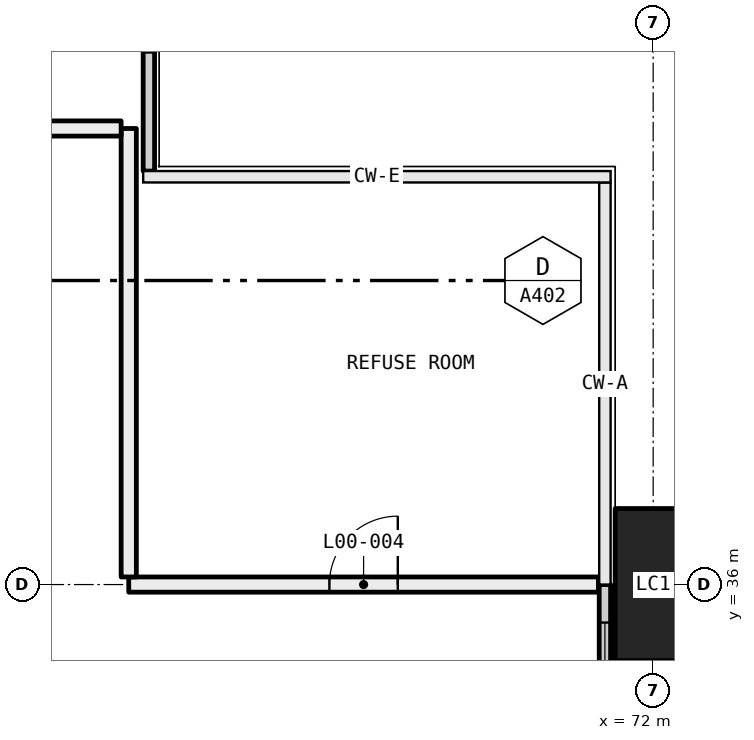
"""IFC4 building model, lengths in metres.
Left out: names, types, materials, properties, quantities, classifications, styles, units other than length and angle.
Written with IfcOpenShell. Run it as: python <this file> out.ifc"""

import sys

from ifc_helpers import new_model, si_unit, direction, frame, frame_2d, origin, origin_2d, place, context, subcontext, project, spatial, rectangle, hollow_rectangle, extrude, element, fill, save


model = new_model("IFC4")
c1 = context("Model", 3, precision=1e-05, world=origin(), true_north=direction((0.0, 1.0)))
c2 = subcontext(c1, "Body", "Model", "MODEL_VIEW")
j1 = project(units=[si_unit("LENGTHUNIT", "METRE"), si_unit("PLANEANGLEUNIT", "RADIAN")], contexts=[c1])
p1 = place(None, origin())
s1 = spatial("IfcSite", under=j1, at=p1, CompositionType="ELEMENT")
p2 = place(p1, origin())
s2 = spatial("IfcBuilding", under=s1, at=p2, CompositionType="ELEMENT")
p3 = place(p2, origin())
s3 = spatial("IfcBuildingStorey", under=s2, at=p3, CompositionType="ELEMENT", Elevation=0.0)
p4 = place(p3, frame((72.0, 36.0, -0.9), z_axis=(0.0, 0.0, 1.0), x_axis=(0.0, 1.0, 0.0)))
e1 = element("IfcColumn", 1, at=p4, inside=s3, PredefinedType="COLUMN", context=c2, shape_type="SweptSolid", body=[
    extrude(hollow_rectangle(XDim=2.0, YDim=1.0, WallThickness=0.08, at=origin_2d()), origin(), (0.0, 0.0, 1.0), 6.5),
])
p5 = place(p3, frame((71.365, 30.0, 0.0), z_axis=(0.0, 0.0, 1.0), x_axis=(0.0, 1.0, 0.0)))
e2 = element("IfcWall", 2, at=p5, inside=s3, PredefinedType="ELEMENTEDWALL", context=c2, shape_type="SweptSolid", body=[
    extrude(rectangle(XDim=6.0, YDim=0.15, at=frame_2d((3.0, 0.0))), origin(), (0.0, 0.0, 1.0), 5.6),
])
p6 = place(p5, frame((0.5, 0.0, 0.45)))
e3 = element("IfcOpeningElement", 3, at=p6, cuts=e2, PredefinedType="OPENING", context=c2, shape_type="SweptSolid", body=[
    extrude(rectangle(XDim=1.4, YDim=5.1, at=frame_2d((0.7, 2.55))), frame((0.0, 0.085, 0.0), z_axis=(0.0, -1.0, 0.0), x_axis=(1.0, 0.0, 0.0)), (0.0, 0.0, 1.0), 0.17),
])
p7 = place(p5, frame((4.1, 0.0, 0.45)))
e4 = element("IfcOpeningElement", 4, at=p7, cuts=e2, PredefinedType="OPENING", context=c2, shape_type="SweptSolid", body=[
    extrude(rectangle(XDim=1.4, YDim=5.1, at=frame_2d((0.7, 2.55))), frame((0.0, 0.085, 0.0), z_axis=(0.0, -1.0, 0.0), x_axis=(1.0, 0.0, 0.0)), (0.0, 0.0, 1.0), 0.17),
])
p8 = place(p5, frame((2.1, 0.0, 0.0)))
e5 = element("IfcOpeningElement", 5, at=p8, cuts=e2, PredefinedType="OPENING", context=c2, shape_type="SweptSolid", body=[
    extrude(rectangle(XDim=1.8, YDim=2.4, at=frame_2d((0.9, 1.2))), frame((0.0, 0.085, 0.0), z_axis=(0.0, -1.0, 0.0), x_axis=(1.0, 0.0, 0.0)), (0.0, 0.0, 1.0), 0.17),
])
p9 = place(p5, frame((2.1, 0.0, 2.6)))
e6 = element("IfcOpeningElement", 6, at=p9, cuts=e2, PredefinedType="OPENING", context=c2, shape_type="SweptSolid", body=[
    extrude(rectangle(XDim=1.8, YDim=2.95, at=frame_2d((0.9, 1.475))), frame((0.0, 0.085, 0.0), z_axis=(0.0, -1.0, 0.0), x_axis=(1.0, 0.0, 0.0)), (0.0, 0.0, 1.0), 0.17),
])
p10 = place(p3, frame((65.365, 41.44, 0.0), z_axis=(0.0, 0.0, 1.0), x_axis=(0.0, 1.0, 0.0)))
e7 = element("IfcWall", 7, at=p10, inside=s3, PredefinedType="ELEMENTEDWALL", context=c2, shape_type="SweptSolid", body=[
    extrude(rectangle(XDim=5.85, YDim=0.15, at=frame_2d((2.925, 0.0))), origin(), (0.0, 0.0, 1.0), 5.6),
])
p11 = place(p10, frame((1.56, 0.0, 0.45)))
e8 = element("IfcOpeningElement", 8, at=p11, cuts=e7, PredefinedType="OPENING", context=c2, shape_type="SweptSolid", body=[
    extrude(rectangle(XDim=4.0, YDim=5.1, at=frame_2d((2.0, 2.55))), frame((0.0, 0.085, 0.0), z_axis=(0.0, -1.0, 0.0), x_axis=(1.0, 0.0, 0.0)), (0.0, 0.0, 1.0), 0.17),
])
p12 = place(p3, frame((71.28, 36.0, 0.0), z_axis=(0.0, 0.0, 1.0), x_axis=(-1.0, 0.0, 0.0)))
e9 = element("IfcWall", 9, at=p12, inside=s3, PredefinedType="PARTITIONING", context=c2, shape_type="SweptSolid", body=[
    extrude(rectangle(XDim=6.18, YDim=0.2, at=frame_2d((3.09, 0.0))), origin(), (0.0, 0.0, 1.0), 5.0),
])
p13 = place(p12, frame((2.64, 0.0, 0.0)))
e10 = element("IfcOpeningElement", 10, at=p13, cuts=e9, PredefinedType="OPENING", context=c2, shape_type="SweptSolid", body=[
    extrude(rectangle(XDim=0.9, YDim=2.1, at=frame_2d((0.45, 1.05))), frame((0.0, 0.11, 0.0), z_axis=(0.0, -1.0, 0.0), x_axis=(1.0, 0.0, 0.0)), (0.0, 0.0, 1.0), 0.22),
])
p14 = place(p3, frame((65.1, 36.1, 0.0), z_axis=(0.0, 0.0, 1.0), x_axis=(0.0, 1.0, 0.0)))
e11 = element("IfcWall", 11, at=p14, inside=s3, PredefinedType="PARTITIONING", context=c2, shape_type="SweptSolid", body=[
    extrude(rectangle(XDim=5.9, YDim=0.2, at=frame_2d((2.95, 0.0))), origin(), (0.0, 0.0, 1.0), 5.6),
])
p15 = place(p3, frame((65.0, 42.0, 0.0), z_axis=(0.0, 0.0, 1.0), x_axis=(-1.0, 0.0, 0.0)))
e12 = element("IfcWall", 12, at=p15, inside=s3, PredefinedType="PARTITIONING", context=c2, shape_type="SweptSolid", body=[
    extrude(rectangle(XDim=5.0, YDim=0.2, at=frame_2d((2.5, 0.0))), origin(), (0.0, 0.0, 1.0), 5.6),
])
p16 = place(p15, frame((1.9, 0.0, 0.0)))
e13 = element("IfcOpeningElement", 13, at=p16, cuts=e12, PredefinedType="OPENING", context=c2, shape_type="SweptSolid", body=[
    extrude(rectangle(XDim=1.2, YDim=2.1, at=frame_2d((0.6, 1.05))), frame((0.0, 0.11, 0.0), z_axis=(0.0, -1.0, 0.0), x_axis=(1.0, 0.0, 0.0)), (0.0, 0.0, 1.0), 0.22),
])
p17 = place(p7, origin())
e14 = element("IfcWindow", 14, at=p17, inside=s3, PartitioningType="SINGLE_PANEL", PredefinedType="WINDOW", context=c2, shape_type="SweptSolid", body=[
    extrude(rectangle(XDim=1.4, YDim=5.1, at=frame_2d((0.7, 2.55))), frame((0.0, 0.03, 0.0), z_axis=(0.0, -1.0, 0.0), x_axis=(1.0, 0.0, 0.0)), (0.0, 0.0, 1.0), 0.06),
])
fill(e4, e14)
p18 = place(p13, frame((0.9, 0.0, 0.0), x_axis=(-1.0, 0.0, 0.0)))
e15 = element("IfcDoor", 15, at=p18, inside=s3, OperationType="SINGLE_SWING_LEFT", PredefinedType="DOOR", context=c2, shape_type="SweptSolid", body=[
    extrude(rectangle(XDim=0.9, YDim=2.1, at=frame_2d((0.45, 1.05))), frame((0.0, 0.025, 0.0), z_axis=(0.0, -1.0, 0.0), x_axis=(1.0, 0.0, 0.0)), (0.0, 0.0, 1.0), 0.05),
])
fill(e10, e15)
save(model, sys.argv[1])
